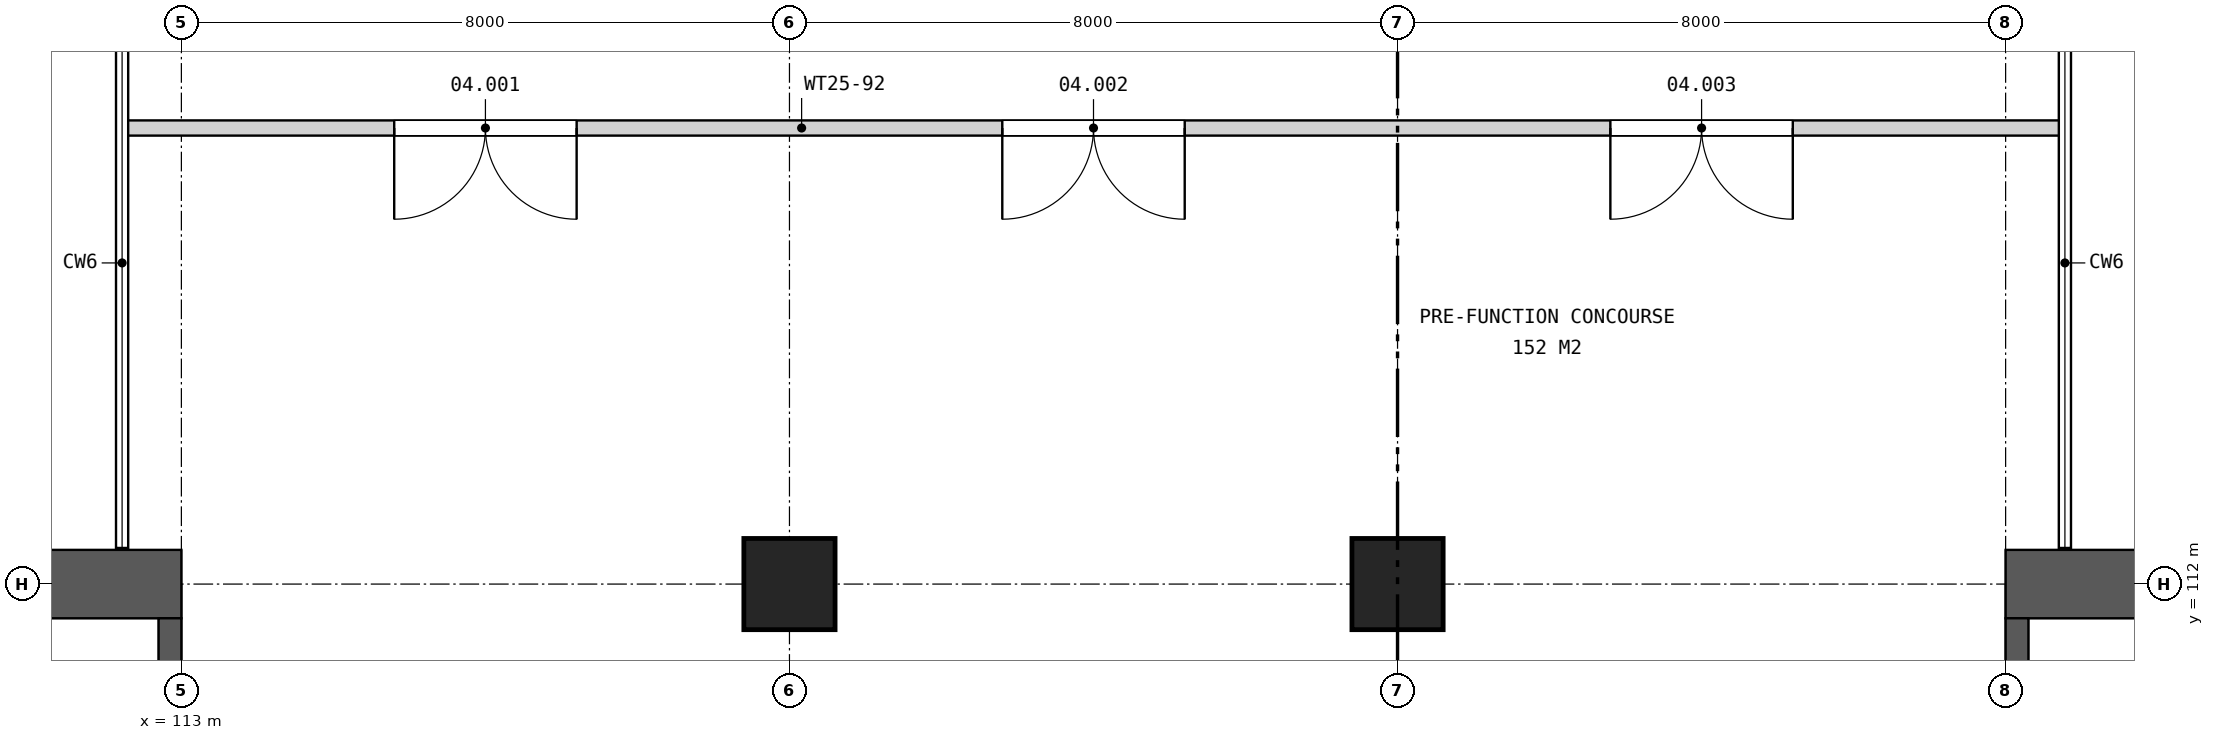
"""IFC4 building model, lengths in metres.
Left out: names, types, materials, properties, quantities, classifications, styles, units other than length and angle.
Written with IfcOpenShell. Run it as: python <this file> out.ifc"""

import sys

from ifc_helpers import new_model, si_unit, direction, frame, frame_2d, origin, origin_2d, place, context, subcontext, project, spatial, rectangle, extrude, element, fill, save


model = new_model("IFC4")
c1 = context("Model", 3, precision=1e-05, world=origin(), true_north=direction((0.0, 1.0)))
c2 = subcontext(c1, "Body", "Model", "MODEL_VIEW")
j1 = project(units=[si_unit("LENGTHUNIT", "METRE"), si_unit("PLANEANGLEUNIT", "RADIAN")], contexts=[c1])
p1 = place(None, origin())
s1 = spatial("IfcSite", under=j1, at=p1, CompositionType="ELEMENT")
p2 = place(p1, origin())
s2 = spatial("IfcBuilding", under=s1, at=p2, CompositionType="ELEMENT")
p3 = place(p2, frame((0.0, 0.0, 34.0)))
s3 = spatial("IfcBuildingStorey", under=s2, at=p3, CompositionType="ELEMENT", Elevation=34.0)
for number, where, z_axis, x_axis in (
    (1, (121.0, 112.0, 0.0), (0.0, 0.0, 1.0), (1.0, 0.0, 0.0)),
    (2, (129.0, 112.0, 0.0), (0.0, 0.0, 1.0), (1.0, 0.0, 0.0)),
):
    element("IfcColumn", number, at=place(p3, frame(where, z_axis=z_axis, x_axis=x_axis)), inside=s3, PredefinedType="COLUMN", context=c2, shape_type="SweptSolid", body=[
        extrude(rectangle(XDim=1.2, YDim=1.2, at=origin_2d()), origin(), (0.0, 0.0, 1.0), 7.5),
    ])
p4 = place(p3, frame((137.0, 112.0, 0.0), z_axis=(0.0, 0.0, 1.0), x_axis=(1.0, 0.0, 0.0)))
e3 = element("IfcWall", 3, at=p4, inside=s3, PredefinedType="SHEAR", context=c2, shape_type="SweptSolid", body=[
    extrude(rectangle(XDim=7.1, YDim=0.9, at=frame_2d((3.55, 0.0))), origin(), (0.0, 0.0, 1.0), 7.5),
])
p5 = place(p3, frame((137.15, 105.7, 0.0), z_axis=(0.0, 0.0, 1.0), x_axis=(0.0, 1.0, 0.0)))
e4 = element("IfcWall", 4, at=p5, inside=s3, PredefinedType="SHEAR", context=c2, shape_type="SweptSolid", body=[
    extrude(rectangle(XDim=5.85, YDim=0.3, at=frame_2d((2.925, 0.0))), origin(), (0.0, 0.0, 1.0), 7.5),
])
p6 = place(p3, frame((113.0, 112.0, 0.0), z_axis=(0.0, 0.0, 1.0), x_axis=(-1.0, 0.0, 0.0)))
e5 = element("IfcWall", 5, at=p6, inside=s3, PredefinedType="SHEAR", context=c2, shape_type="SweptSolid", body=[
    extrude(rectangle(XDim=7.1, YDim=0.9, at=frame_2d((3.55, 0.0))), origin(), (0.0, 0.0, 1.0), 7.5),
])
p7 = place(p3, frame((112.85, 111.55, 0.0), z_axis=(0.0, 0.0, 1.0), x_axis=(0.0, -1.0, 0.0)))
e6 = element("IfcWall", 6, at=p7, inside=s3, PredefinedType="SHEAR", context=c2, shape_type="SweptSolid", body=[
    extrude(rectangle(XDim=5.85, YDim=0.3, at=frame_2d((2.925, 0.0))), origin(), (0.0, 0.0, 1.0), 7.5),
])
p8 = place(p3, frame((112.2, 118.0, 0.0), z_axis=(0.0, 0.0, 1.0), x_axis=(1.0, 0.0, 0.0)))
e7 = element("IfcWall", 7, at=p8, inside=s3, PredefinedType="PARTITIONING", context=c2, shape_type="SweptSolid", body=[
    extrude(rectangle(XDim=25.6, YDim=0.2, at=frame_2d((12.8, 0.0))), origin(), (0.0, 0.0, 1.0), 6.632),
])
p9 = place(p8, frame((3.6, 0.0, 0.0)))
e8 = element("IfcOpeningElement", 8, at=p9, cuts=e7, PredefinedType="OPENING", context=c2, shape_type="SweptSolid", body=[
    extrude(rectangle(XDim=2.4, YDim=2.4, at=frame_2d((1.2, 1.2))), frame((0.0, 0.11, 0.0), z_axis=(0.0, -1.0, 0.0), x_axis=(1.0, 0.0, 0.0)), (0.0, 0.0, 1.0), 0.22),
])
p10 = place(p8, frame((11.6, 0.0, 0.0)))
e9 = element("IfcOpeningElement", 9, at=p10, cuts=e7, PredefinedType="OPENING", context=c2, shape_type="SweptSolid", body=[
    extrude(rectangle(XDim=2.4, YDim=2.4, at=frame_2d((1.2, 1.2))), frame((0.0, 0.11, 0.0), z_axis=(0.0, -1.0, 0.0), x_axis=(1.0, 0.0, 0.0)), (0.0, 0.0, 1.0), 0.22),
])
p11 = place(p8, frame((19.6, 0.0, 0.0)))
e10 = element("IfcOpeningElement", 10, at=p11, cuts=e7, PredefinedType="OPENING", context=c2, shape_type="SweptSolid", body=[
    extrude(rectangle(XDim=2.4, YDim=2.4, at=frame_2d((1.2, 1.2))), frame((0.0, 0.11, 0.0), z_axis=(0.0, -1.0, 0.0), x_axis=(1.0, 0.0, 0.0)), (0.0, 0.0, 1.0), 0.22),
])
p12 = place(p9, frame((2.4, 0.0, 0.0), z_axis=(0.0, 0.0, 1.0), x_axis=(-1.0, 0.0, 0.0)))
e11 = element("IfcDoor", 11, at=p12, inside=s3, OperationType="DOUBLE_DOOR_SINGLE_SWING", PredefinedType="DOOR", context=c2, shape_type="SweptSolid", body=[
    extrude(rectangle(XDim=2.4, YDim=2.4, at=frame_2d((1.2, 1.2))), frame((0.0, 0.025, 0.0), z_axis=(0.0, -1.0, 0.0), x_axis=(1.0, 0.0, 0.0)), (0.0, 0.0, 1.0), 0.05),
])
fill(e8, e11)
p13 = place(p10, frame((2.4, 0.0, 0.0), z_axis=(0.0, 0.0, 1.0), x_axis=(-1.0, 0.0, 0.0)))
e12 = element("IfcDoor", 12, at=p13, inside=s3, OperationType="DOUBLE_DOOR_SINGLE_SWING", PredefinedType="DOOR", context=c2, shape_type="SweptSolid", body=[
    extrude(rectangle(XDim=2.4, YDim=2.4, at=frame_2d((1.2, 1.2))), frame((0.0, 0.025, 0.0), z_axis=(0.0, -1.0, 0.0), x_axis=(1.0, 0.0, 0.0)), (0.0, 0.0, 1.0), 0.05),
])
fill(e9, e12)
p14 = place(p11, frame((2.4, 0.0, 0.0), z_axis=(0.0, 0.0, 1.0), x_axis=(-1.0, 0.0, 0.0)))
e13 = element("IfcDoor", 13, at=p14, inside=s3, OperationType="DOUBLE_DOOR_SINGLE_SWING", PredefinedType="DOOR", context=c2, shape_type="SweptSolid", body=[
    extrude(rectangle(XDim=2.4, YDim=2.4, at=frame_2d((1.2, 1.2))), frame((0.0, 0.025, 0.0), z_axis=(0.0, -1.0, 0.0), x_axis=(1.0, 0.0, 0.0)), (0.0, 0.0, 1.0), 0.05),
])
fill(e10, e13)
save(model, sys.argv[1])
